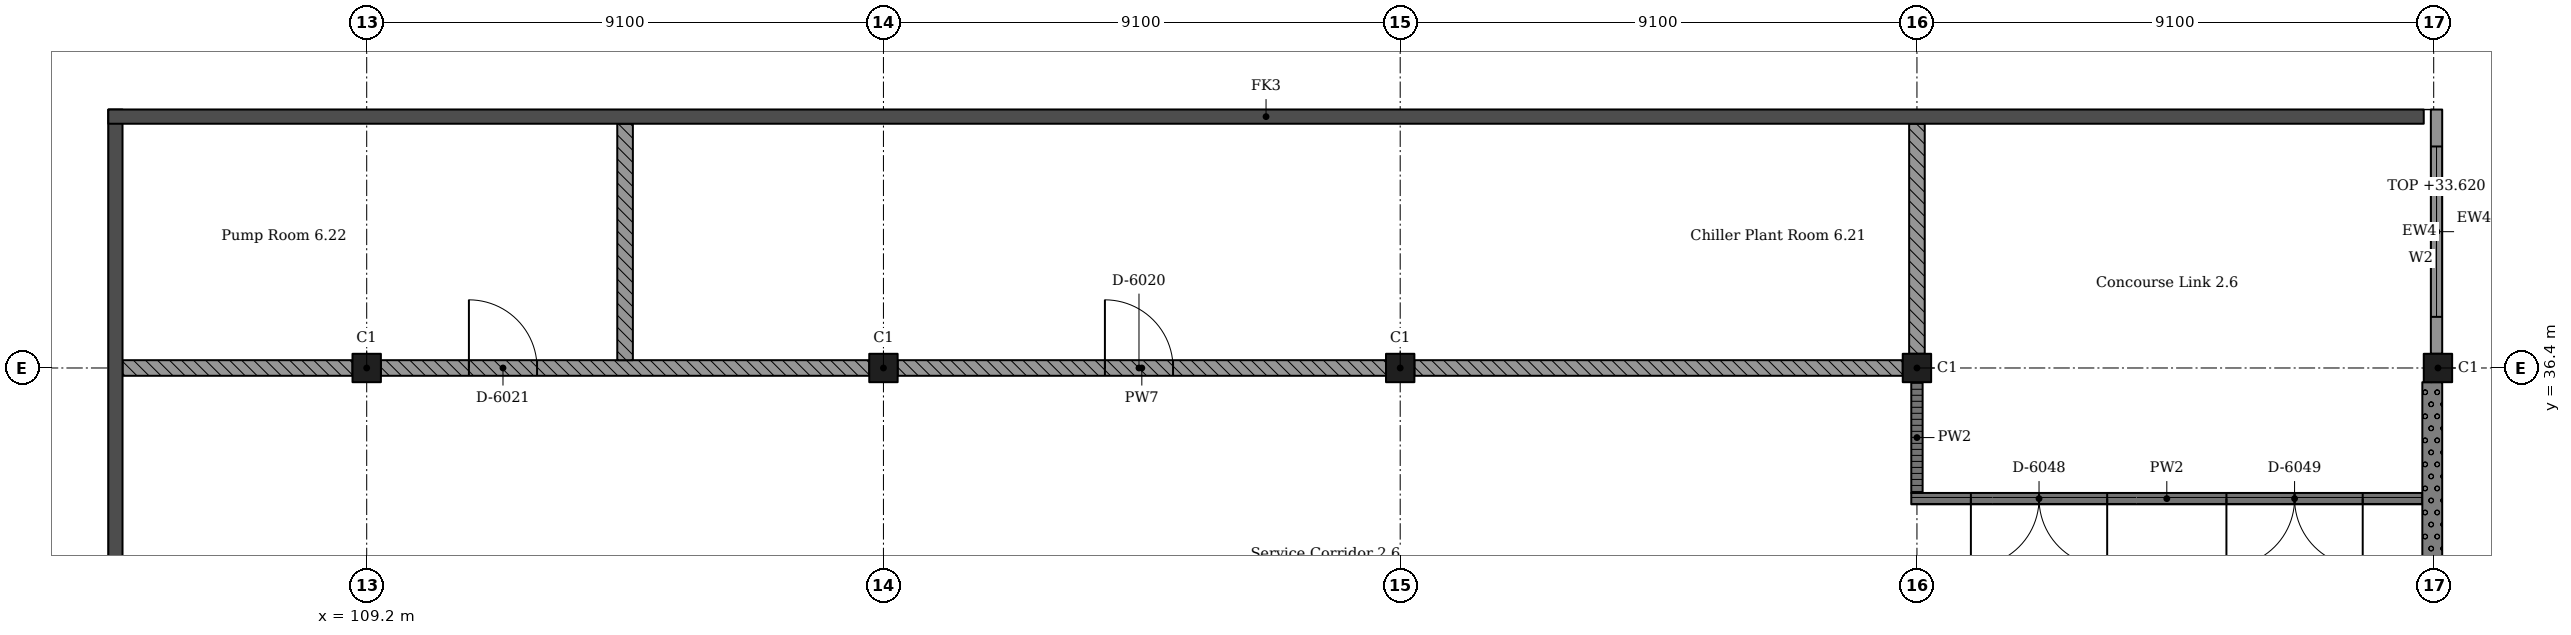
"""IFC4 building model, lengths in metres.
Left out: names, types, materials, properties, quantities, classifications, styles, units other than length and angle.
Written with IfcOpenShell. Run it as: python <this file> out.ifc"""

import sys

from ifc_helpers import new_model, si_unit, direction, frame, frame_2d, origin, origin_2d, place, context, subcontext, project, spatial, rectangle, extrude, element, fill, save


model = new_model("IFC4")
c1 = context("Model", 3, precision=1e-05, world=origin(), true_north=direction((0.0, 1.0)))
c2 = subcontext(c1, "Body", "Model", "MODEL_VIEW")
j1 = project(units=[si_unit("LENGTHUNIT", "METRE"), si_unit("PLANEANGLEUNIT", "RADIAN")], contexts=[c1])
p1 = place(None, origin())
s1 = spatial("IfcSite", under=j1, at=p1, CompositionType="ELEMENT")
p2 = place(p1, origin())
s2 = spatial("IfcBuilding", under=s1, at=p2, CompositionType="ELEMENT")
p3 = place(p2, frame((0.0, 0.0, 29.12)))
s3 = spatial("IfcBuildingStorey", under=s2, at=p3, CompositionType="ELEMENT", Elevation=29.12)
for number, where, z_axis, x_axis in (
    (1, (109.2, 36.4, 0.0), (0.0, 0.0, 1.0), (1.0, 0.0, 0.0)),
    (2, (118.3, 36.4, 0.0), (0.0, 0.0, 1.0), (1.0, 0.0, 0.0)),
    (3, (127.4, 36.4, 0.0), (0.0, 0.0, 1.0), (1.0, 0.0, 0.0)),
    (4, (136.5, 36.4, 0.0), (0.0, 0.0, 1.0), (1.0, 0.0, 0.0)),
    (5, (145.675, 36.4, 0.0), (0.0, 0.0, 1.0), (1.0, 0.0, 0.0)),
):
    element("IfcColumn", number, at=place(p3, frame(where, z_axis=z_axis, x_axis=x_axis)), inside=s3, PredefinedType="COLUMN", context=c2, shape_type="SweptSolid", body=[
        extrude(rectangle(XDim=0.5, YDim=0.5, at=origin_2d()), origin(), (0.0, 0.0, 1.0), 4.55),
    ])
p4 = place(p3, frame((104.775, 40.95, 0.0), z_axis=(0.0, 0.0, 1.0), x_axis=(0.0, -1.0, 0.0)))
e6 = element("IfcWall", 6, at=p4, inside=s3, PredefinedType="SHEAR", context=c2, shape_type="SweptSolid", body=[
    extrude(rectangle(XDim=40.775, YDim=0.25, at=frame_2d((20.387, 0.0))), origin(), (0.0, 0.0, 1.0), 4.55),
])
p5 = place(p3, frame((104.65, 40.825, 0.0), z_axis=(0.0, 0.0, 1.0), x_axis=(1.0, 0.0, 0.0)))
e7 = element("IfcWall", 7, at=p5, inside=s3, PredefinedType="SHEAR", context=c2, shape_type="SweptSolid", body=[
    extrude(rectangle(XDim=40.775, YDim=0.25, at=frame_2d((20.388, 0.0))), origin(), (0.0, 0.0, 1.0), 4.55),
])
p6 = place(p3, frame((145.575, 27.55, 0.0), z_axis=(0.0, 0.0, 1.0), x_axis=(0.0, 1.0, 0.0)))
e8 = element("IfcWall", 8, at=p6, inside=s3, PredefinedType="SOLIDWALL", context=c2, shape_type="SweptSolid", body=[
    extrude(rectangle(XDim=8.6, YDim=0.35, at=frame_2d((4.3, 0.0))), origin(), (0.0, 0.0, 1.0), 4.5),
])
p7 = place(p3, frame((145.65, 36.65, 0.0), z_axis=(0.0, 0.0, 1.0), x_axis=(0.0, 1.0, 0.0)))
e9 = element("IfcWall", 9, at=p7, inside=s3, PredefinedType="SOLIDWALL", context=c2, shape_type="SweptSolid", body=[
    extrude(rectangle(XDim=4.3, YDim=0.2, at=frame_2d((2.15, 0.0))), origin(), (0.0, 0.0, 1.0), 4.5),
])
p8 = place(p7, frame((0.65, 0.0, 0.6)))
e10 = element("IfcOpeningElement", 10, at=p8, cuts=e9, PredefinedType="OPENING", context=c2, shape_type="SweptSolid", body=[
    extrude(rectangle(XDim=3.0, YDim=3.0, at=frame_2d((1.5, 1.5))), frame((0.0, 0.11, 0.0), z_axis=(0.0, -1.0, 0.0), x_axis=(1.0, 0.0, 0.0)), (0.0, 0.0, 1.0), 0.22),
])
p9 = place(p3, frame((108.95, 36.4, 0.0), z_axis=(0.0, 0.0, 1.0), x_axis=(-1.0, 0.0, 0.0)))
e11 = element("IfcWall", 11, at=p9, inside=s3, PredefinedType="SOLIDWALL", context=c2, shape_type="SweptSolid", body=[
    extrude(rectangle(XDim=4.05, YDim=0.275, at=frame_2d((2.025, 0.0))), origin(), (0.0, 0.0, 1.0), 3.88),
])
p10 = place(p3, frame((109.45, 36.4, 0.0), z_axis=(0.0, 0.0, 1.0), x_axis=(1.0, 0.0, 0.0)))
e12 = element("IfcWall", 12, at=p10, inside=s3, PredefinedType="SOLIDWALL", context=c2, shape_type="SweptSolid", body=[
    extrude(rectangle(XDim=8.6, YDim=0.275, at=frame_2d((4.3, 0.0))), origin(), (0.0, 0.0, 1.0), 3.88),
])
p11 = place(p10, frame((1.55, 0.0, 0.0)))
e13 = element("IfcOpeningElement", 13, at=p11, cuts=e12, PredefinedType="OPENING", context=c2, shape_type="SweptSolid", body=[
    extrude(rectangle(XDim=1.2, YDim=2.4, at=frame_2d((0.6, 1.2))), frame((0.0, 0.147, 0.0), z_axis=(0.0, -1.0, 0.0), x_axis=(1.0, 0.0, 0.0)), (0.0, 0.0, 1.0), 0.295),
])
p12 = place(p3, frame((113.75, 36.538, 0.0), z_axis=(0.0, 0.0, 1.0), x_axis=(0.0, 1.0, 0.0)))
e14 = element("IfcWall", 14, at=p12, inside=s3, PredefinedType="SOLIDWALL", context=c2, shape_type="SweptSolid", body=[
    extrude(rectangle(XDim=4.162, YDim=0.275, at=frame_2d((2.081, 0.0))), origin(), (0.0, 0.0, 1.0), 3.88),
])
p13 = place(p3, frame((127.15, 36.4, 0.0), z_axis=(0.0, 0.0, 1.0), x_axis=(-1.0, 0.0, 0.0)))
e15 = element("IfcWall", 15, at=p13, inside=s3, PredefinedType="SOLIDWALL", context=c2, shape_type="SweptSolid", body=[
    extrude(rectangle(XDim=8.6, YDim=0.275, at=frame_2d((4.3, 0.0))), origin(), (0.0, 0.0, 1.0), 3.88),
])
p14 = place(p13, frame((3.75, 0.0, 0.0)))
e16 = element("IfcOpeningElement", 16, at=p14, cuts=e15, PredefinedType="OPENING", context=c2, shape_type="SweptSolid", body=[
    extrude(rectangle(XDim=1.2, YDim=2.4, at=frame_2d((0.6, 1.2))), frame((0.0, 0.147, 0.0), z_axis=(0.0, -1.0, 0.0), x_axis=(1.0, 0.0, 0.0)), (0.0, 0.0, 1.0), 0.295),
])
p15 = place(p3, frame((136.25, 36.4, 0.0), z_axis=(0.0, 0.0, 1.0), x_axis=(-1.0, 0.0, 0.0)))
e17 = element("IfcWall", 17, at=p15, inside=s3, PredefinedType="SOLIDWALL", context=c2, shape_type="SweptSolid", body=[
    extrude(rectangle(XDim=8.6, YDim=0.275, at=frame_2d((4.3, 0.0))), origin(), (0.0, 0.0, 1.0), 3.88),
])
p16 = place(p3, frame((136.4, 34.1, 0.0), z_axis=(0.0, 0.0, 1.0), x_axis=(1.0, 0.0, 0.0)))
e18 = element("IfcWall", 18, at=p16, inside=s3, PredefinedType="PARTITIONING", context=c2, shape_type="SweptSolid", body=[
    extrude(rectangle(XDim=9.0, YDim=0.2, at=frame_2d((4.5, 0.0))), origin(), (0.0, 0.0, 1.0), 3.88),
])
p17 = place(p16, frame((1.05, 0.0, 0.0)))
e19 = element("IfcOpeningElement", 19, at=p17, cuts=e18, PredefinedType="OPENING", context=c2, shape_type="SweptSolid", body=[
    extrude(rectangle(XDim=2.4, YDim=2.4, at=frame_2d((1.2, 1.2))), frame((0.0, 0.11, 0.0), z_axis=(0.0, -1.0, 0.0), x_axis=(1.0, 0.0, 0.0)), (0.0, 0.0, 1.0), 0.22),
])
p18 = place(p16, frame((5.55, 0.0, 0.0)))
e20 = element("IfcOpeningElement", 20, at=p18, cuts=e18, PredefinedType="OPENING", context=c2, shape_type="SweptSolid", body=[
    extrude(rectangle(XDim=2.4, YDim=2.4, at=frame_2d((1.2, 1.2))), frame((0.0, 0.11, 0.0), z_axis=(0.0, -1.0, 0.0), x_axis=(1.0, 0.0, 0.0)), (0.0, 0.0, 1.0), 0.22),
])
p19 = place(p3, frame((136.5, 36.15, 0.0), z_axis=(0.0, 0.0, 1.0), x_axis=(0.0, -1.0, 0.0)))
e21 = element("IfcWall", 21, at=p19, inside=s3, PredefinedType="PARTITIONING", context=c2, shape_type="SweptSolid", body=[
    extrude(rectangle(XDim=1.95, YDim=0.2, at=frame_2d((0.975, 0.0))), origin(), (0.0, 0.0, 1.0), 3.88),
])
p20 = place(p3, frame((136.5, 40.7, 0.0), z_axis=(0.0, 0.0, 1.0), x_axis=(0.0, -1.0, 0.0)))
e22 = element("IfcWall", 22, at=p20, inside=s3, PredefinedType="SOLIDWALL", context=c2, shape_type="SweptSolid", body=[
    extrude(rectangle(XDim=4.05, YDim=0.275, at=frame_2d((2.025, 0.0))), origin(), (0.0, 0.0, 1.0), 3.88),
])
p21 = place(p8, origin())
e23 = element("IfcWindow", 23, at=p21, inside=s3, PartitioningType="SINGLE_PANEL", PredefinedType="WINDOW", context=c2, shape_type="SweptSolid", body=[
    extrude(rectangle(XDim=3.0, YDim=3.0, at=frame_2d((1.5, 1.5))), frame((0.0, 0.03, 0.0), z_axis=(0.0, -1.0, 0.0), x_axis=(1.0, 0.0, 0.0)), (0.0, 0.0, 1.0), 0.06),
])
fill(e10, e23)
p22 = place(p14, origin())
e24 = element("IfcDoor", 24, at=p22, inside=s3, OperationType="SINGLE_SWING_RIGHT", PredefinedType="DOOR", context=c2, shape_type="SweptSolid", body=[
    extrude(rectangle(XDim=1.2, YDim=2.4, at=frame_2d((0.6, 1.2))), frame((0.0, 0.025, 0.0), z_axis=(0.0, -1.0, 0.0), x_axis=(1.0, 0.0, 0.0)), (0.0, 0.0, 1.0), 0.05),
])
fill(e16, e24)
p23 = place(p11, origin())
e25 = element("IfcDoor", 25, at=p23, inside=s3, OperationType="SINGLE_SWING_RIGHT", PredefinedType="DOOR", context=c2, shape_type="SweptSolid", body=[
    extrude(rectangle(XDim=1.2, YDim=2.4, at=frame_2d((0.6, 1.2))), frame((0.0, 0.025, 0.0), z_axis=(0.0, -1.0, 0.0), x_axis=(1.0, 0.0, 0.0)), (0.0, 0.0, 1.0), 0.05),
])
fill(e13, e25)
p24 = place(p17, origin())
e26 = element("IfcDoor", 26, at=p24, inside=s3, OperationType="DOUBLE_DOOR_SINGLE_SWING", PredefinedType="DOOR", context=c2, shape_type="SweptSolid", body=[
    extrude(rectangle(XDim=2.4, YDim=2.4, at=frame_2d((1.2, 1.2))), frame((0.0, 0.025, 0.0), z_axis=(0.0, -1.0, 0.0), x_axis=(1.0, 0.0, 0.0)), (0.0, 0.0, 1.0), 0.05),
])
fill(e19, e26)
p25 = place(p18, origin())
e27 = element("IfcDoor", 27, at=p25, inside=s3, OperationType="DOUBLE_DOOR_SINGLE_SWING", PredefinedType="DOOR", context=c2, shape_type="SweptSolid", body=[
    extrude(rectangle(XDim=2.4, YDim=2.4, at=frame_2d((1.2, 1.2))), frame((0.0, 0.025, 0.0), z_axis=(0.0, -1.0, 0.0), x_axis=(1.0, 0.0, 0.0)), (0.0, 0.0, 1.0), 0.05),
])
fill(e20, e27)
save(model, sys.argv[1])
